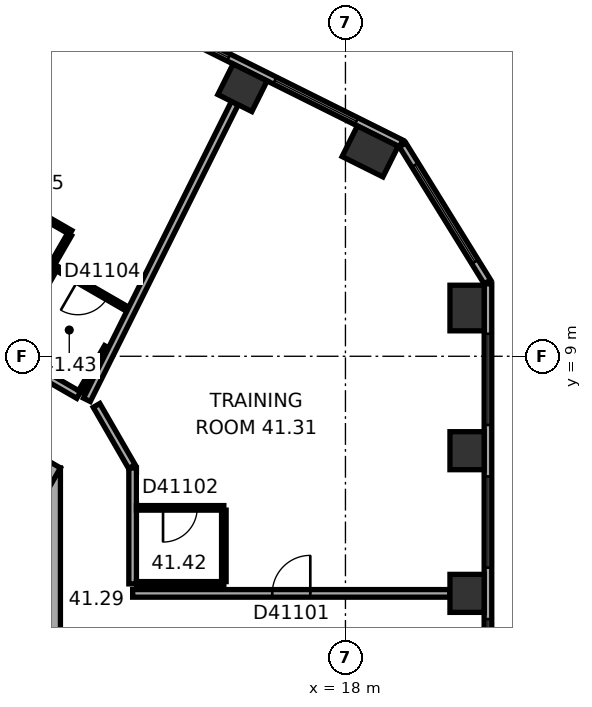
"""IFC4 building model, lengths in metres.
Left out: names, types, materials, properties, quantities, classifications, styles, units other than length and angle.
Written with IfcOpenShell. Run it as: python <this file> out.ifc"""

import sys

from ifc_helpers import new_model, si_unit, direction, frame, frame_2d, origin, origin_2d, place, context, subcontext, project, spatial, rectangle, extrude, element, fill, save


model = new_model("IFC4")
c1 = context("Model", 3, precision=1e-05, world=origin(), true_north=direction((0.0, 1.0)))
c2 = subcontext(c1, "Body", "Model", "MODEL_VIEW")
j1 = project(units=[si_unit("LENGTHUNIT", "METRE"), si_unit("PLANEANGLEUNIT", "RADIAN")], contexts=[c1])
p1 = place(None, origin())
s1 = spatial("IfcSite", under=j1, at=p1, CompositionType="ELEMENT")
p2 = place(p1, origin())
s2 = spatial("IfcBuilding", under=s1, at=p2, CompositionType="ELEMENT")
p3 = place(p2, frame((0.0, 0.0, 168.8)))
s3 = spatial("IfcBuildingStorey", under=s2, at=p3, CompositionType="ELEMENT", Elevation=168.8)
for number, where, z_axis, x_axis in (
    (1, (21.2, 2.761, 0.0), (0.0, 0.0, 1.0), (0.0, 1.0, 0.0)),
    (2, (21.2, 6.515, 0.0), (0.0, 0.0, 1.0), (0.0, 1.0, 0.0)),
):
    element("IfcColumn", number, at=place(p3, frame(where, z_axis=z_axis, x_axis=x_axis)), inside=s3, PredefinedType="COLUMN", context=c2, shape_type="SweptSolid", body=[
        extrude(rectangle(XDim=1.0, YDim=0.9, at=origin_2d()), origin(), (0.0, 0.0, 1.0), 3.7),
    ])
for number, where, z_axis, x_axis in (
    (3, (21.2, 10.27, 0.0), (0.0, 0.0, 1.0), (0.0, 1.0, 0.0)),
    (4, (18.65, 14.39, 0.0), (0.0, 0.0, 1.0), (-0.895, 0.446, 0.0)),
):
    element("IfcColumn", number, at=place(p3, frame(where, z_axis=z_axis, x_axis=x_axis)), inside=s3, PredefinedType="COLUMN", context=c2, shape_type="SweptSolid", body=[
        extrude(rectangle(XDim=1.2, YDim=0.9, at=origin_2d()), origin(), (0.0, 0.0, 1.0), 3.7),
    ])
p4 = place(p3, frame((15.29, 16.065, 0.0), z_axis=(0.0, 0.0, 1.0), x_axis=(-0.894934361602, 0.44619781311, 0.0)))
e5 = element("IfcColumn", 5, at=p4, inside=s3, PredefinedType="COLUMN", context=c2, shape_type="SweptSolid", body=[
    extrude(rectangle(XDim=1.0, YDim=0.9, at=origin_2d()), origin(), (0.0, 0.0, 1.0), 3.7),
])
p5 = place(p3, frame((10.0, -6.062, 0.0), z_axis=(0.0, 0.0, 1.0), x_axis=(0.0, 1.0, 0.0)))
e6 = element("IfcWall", 6, at=p5, inside=s3, PredefinedType="SHEAR", context=c2, shape_type="SweptSolid", body=[
    extrude(rectangle(XDim=12.125, YDim=1.0, at=frame_2d((6.062, 0.0))), origin(), (0.0, 0.0, 1.0), 3.7),
])
p6 = place(p5, frame((6.262, 0.0, 0.0)))
e7 = element("IfcOpeningElement", 7, at=p6, cuts=e6, PredefinedType="OPENING", context=c2, shape_type="SweptSolid", body=[
    extrude(rectangle(XDim=1.5, YDim=2.1, at=frame_2d((0.75, 1.05))), frame((0.0, 0.51, 0.0), z_axis=(0.0, -1.0, 0.0), x_axis=(1.0, 0.0, 0.0)), (0.0, 0.0, 1.0), 1.02),
])
p7 = place(p5, frame((1.812, 0.0, 0.0)))
e8 = element("IfcOpeningElement", 8, at=p7, cuts=e6, PredefinedType="OPENING", context=c2, shape_type="SweptSolid", body=[
    extrude(rectangle(XDim=0.9, YDim=2.1, at=frame_2d((0.45, 1.05))), frame((0.0, 0.51, 0.0), z_axis=(0.0, -1.0, 0.0), x_axis=(1.0, 0.0, 0.0)), (0.0, 0.0, 1.0), 1.02),
])
p8 = place(p5, frame((4.412, 0.0, 0.0)))
e9 = element("IfcOpeningElement", 9, at=p8, cuts=e6, PredefinedType="OPENING", context=c2, shape_type="SweptSolid", body=[
    extrude(rectangle(XDim=0.9, YDim=2.1, at=frame_2d((0.45, 1.05))), frame((0.0, 0.51, 0.0), z_axis=(0.0, -1.0, 0.0), x_axis=(1.0, 0.0, 0.0)), (0.0, 0.0, 1.0), 1.02),
])
p9 = place(p3, frame((10.25, 5.629, 0.0), z_axis=(0.0, 0.0, 1.0), x_axis=(-0.866022616891, 0.50000482701, 0.0)))
e10 = element("IfcWall", 10, at=p9, inside=s3, PredefinedType="SHEAR", context=c2, shape_type="SweptSolid", body=[
    extrude(rectangle(XDim=12.125, YDim=1.0, at=frame_2d((6.062, 0.0))), origin(), (0.0, 0.0, 1.0), 3.7),
])
p10 = place(p9, frame((4.012, 0.0, 0.0)))
e11 = element("IfcOpeningElement", 11, at=p10, cuts=e10, PredefinedType="OPENING", context=c2, shape_type="SweptSolid", body=[
    extrude(rectangle(XDim=0.9, YDim=2.1, at=frame_2d((0.45, 1.05))), frame((0.0, 0.51, 0.0), z_axis=(0.0, -1.0, 0.0), x_axis=(1.0, 0.0, 0.0)), (0.0, 0.0, 1.0), 1.02),
])
p11 = place(p9, frame((7.912, 0.0, 0.0)))
e12 = element("IfcOpeningElement", 12, at=p11, cuts=e10, PredefinedType="OPENING", context=c2, shape_type="SweptSolid", body=[
    extrude(rectangle(XDim=0.9, YDim=2.1, at=frame_2d((0.45, 1.05))), frame((0.0, 0.51, 0.0), z_axis=(0.0, -1.0, 0.0), x_axis=(1.0, 0.0, 0.0)), (0.0, 0.0, 1.0), 1.02),
])
p12 = place(p3, frame((21.75, -9.138, 0.0), z_axis=(0.0, 0.0, 1.0), x_axis=(0.0, 1.0, 0.0)))
e13 = element("IfcWall", 13, at=p12, inside=s3, PredefinedType="STANDARD", context=c2, shape_type="SweptSolid", body=[
    extrude(rectangle(XDim=20.044, YDim=0.2, at=frame_2d((10.022, 0.0))), origin(), (0.0, 0.0, 1.0), 3.7),
])
p13 = place(p12, frame((1.314, 0.0, 0.9)))
e14 = element("IfcOpeningElement", 14, at=p13, cuts=e13, PredefinedType="OPENING", context=c2, shape_type="SweptSolid", body=[
    extrude(rectangle(XDim=2.4, YDim=2.0, at=frame_2d((1.2, 1.0))), frame((0.0, 0.11, 0.0), z_axis=(0.0, -1.0, 0.0), x_axis=(1.0, 0.0, 0.0)), (0.0, 0.0, 1.0), 0.22),
])
p14 = place(p12, frame((5.069, 0.0, 0.9)))
e15 = element("IfcOpeningElement", 15, at=p14, cuts=e13, PredefinedType="OPENING", context=c2, shape_type="SweptSolid", body=[
    extrude(rectangle(XDim=2.4, YDim=2.0, at=frame_2d((1.2, 1.0))), frame((0.0, 0.11, 0.0), z_axis=(0.0, -1.0, 0.0), x_axis=(1.0, 0.0, 0.0)), (0.0, 0.0, 1.0), 0.22),
])
p15 = place(p12, frame((8.823, 0.0, 0.9)))
e16 = element("IfcOpeningElement", 16, at=p15, cuts=e13, PredefinedType="OPENING", context=c2, shape_type="SweptSolid", body=[
    extrude(rectangle(XDim=2.4, YDim=2.0, at=frame_2d((1.2, 1.0))), frame((0.0, 0.11, 0.0), z_axis=(0.0, -1.0, 0.0), x_axis=(1.0, 0.0, 0.0)), (0.0, 0.0, 1.0), 0.22),
])
p16 = place(p12, frame((12.577, 0.0, 0.9)))
e17 = element("IfcOpeningElement", 17, at=p16, cuts=e13, PredefinedType="OPENING", context=c2, shape_type="SweptSolid", body=[
    extrude(rectangle(XDim=2.4, YDim=2.0, at=frame_2d((1.2, 1.0))), frame((0.0, 0.11, 0.0), z_axis=(0.0, -1.0, 0.0), x_axis=(1.0, 0.0, 0.0)), (0.0, 0.0, 1.0), 0.22),
])
p17 = place(p12, frame((16.331, 0.0, 0.9)))
e18 = element("IfcOpeningElement", 18, at=p17, cuts=e13, PredefinedType="OPENING", context=c2, shape_type="SweptSolid", body=[
    extrude(rectangle(XDim=2.4, YDim=2.0, at=frame_2d((1.2, 1.0))), frame((0.0, 0.11, 0.0), z_axis=(0.0, -1.0, 0.0), x_axis=(1.0, 0.0, 0.0)), (0.0, 0.0, 1.0), 0.22),
])
p18 = place(p3, frame((21.735, 10.958, 0.0), z_axis=(0.0, 0.0, 1.0), x_axis=(-0.526213807775, 0.850352296702, 0.0)))
e19 = element("IfcWall", 19, at=p18, inside=s3, PredefinedType="STANDARD", context=c2, shape_type="SweptSolid", body=[
    extrude(rectangle(XDim=4.238, YDim=0.2, at=frame_2d((2.119, 0.0))), origin(), (0.0, 0.0, 1.0), 3.7),
])
p19 = place(p18, frame((0.619, 0.0, 0.9)))
e20 = element("IfcOpeningElement", 20, at=p19, cuts=e19, PredefinedType="OPENING", context=c2, shape_type="SweptSolid", body=[
    extrude(rectangle(XDim=3.0, YDim=2.0, at=frame_2d((1.5, 1.0))), frame((0.0, 0.11, 0.0), z_axis=(0.0, -1.0, 0.0), x_axis=(1.0, 0.0, 0.0)), (0.0, 0.0, 1.0), 0.22),
])
p20 = place(p3, frame((19.464, 14.599, 0.0), z_axis=(0.0, 0.0, 1.0), x_axis=(-0.894935755043, 0.446195018289, 0.0)))
e21 = element("IfcWall", 21, at=p20, inside=s3, PredefinedType="STANDARD", context=c2, shape_type="SweptSolid", body=[
    extrude(rectangle(XDim=20.044, YDim=0.2, at=frame_2d((10.022, 0.0))), origin(), (0.0, 0.0, 1.0), 3.7),
])
p21 = place(p20, frame((1.313, 0.0, 0.9)))
e22 = element("IfcOpeningElement", 22, at=p21, cuts=e21, PredefinedType="OPENING", context=c2, shape_type="SweptSolid", body=[
    extrude(rectangle(XDim=2.4, YDim=2.0, at=frame_2d((1.2, 1.0))), frame((0.0, 0.11, 0.0), z_axis=(0.0, -1.0, 0.0), x_axis=(1.0, 0.0, 0.0)), (0.0, 0.0, 1.0), 0.22),
])
p22 = place(p20, frame((5.067, 0.0, 0.9)))
e23 = element("IfcOpeningElement", 23, at=p22, cuts=e21, PredefinedType="OPENING", context=c2, shape_type="SweptSolid", body=[
    extrude(rectangle(XDim=2.4, YDim=2.0, at=frame_2d((1.2, 1.0))), frame((0.0, 0.11, 0.0), z_axis=(0.0, -1.0, 0.0), x_axis=(1.0, 0.0, 0.0)), (0.0, 0.0, 1.0), 0.22),
])
p23 = place(p20, frame((8.821, 0.0, 0.9)))
e24 = element("IfcOpeningElement", 24, at=p23, cuts=e21, PredefinedType="OPENING", context=c2, shape_type="SweptSolid", body=[
    extrude(rectangle(XDim=2.4, YDim=2.0, at=frame_2d((1.2, 1.0))), frame((0.0, 0.11, 0.0), z_axis=(0.0, -1.0, 0.0), x_axis=(1.0, 0.0, 0.0)), (0.0, 0.0, 1.0), 0.22),
])
p24 = place(p20, frame((12.575, 0.0, 0.9)))
e25 = element("IfcOpeningElement", 25, at=p24, cuts=e21, PredefinedType="OPENING", context=c2, shape_type="SweptSolid", body=[
    extrude(rectangle(XDim=2.4, YDim=2.0, at=frame_2d((1.2, 1.0))), frame((0.0, 0.11, 0.0), z_axis=(0.0, -1.0, 0.0), x_axis=(1.0, 0.0, 0.0)), (0.0, 0.0, 1.0), 0.22),
])
p25 = place(p20, frame((16.329, 0.0, 0.9)))
e26 = element("IfcOpeningElement", 26, at=p25, cuts=e21, PredefinedType="OPENING", context=c2, shape_type="SweptSolid", body=[
    extrude(rectangle(XDim=2.4, YDim=2.0, at=frame_2d((1.2, 1.0))), frame((0.0, 0.11, 0.0), z_axis=(0.0, -1.0, 0.0), x_axis=(1.0, 0.0, 0.0)), (0.0, 0.0, 1.0), 0.22),
])
p26 = place(p3, frame((7.878, 13.927, 0.0), z_axis=(0.0, 0.0, 1.0), x_axis=(0.866021245731, -0.500007201891, 0.0)))
e27 = element("IfcWall", 27, at=p26, inside=s3, PredefinedType="PARTITIONING", context=c2, shape_type="SweptSolid", body=[
    extrude(rectangle(XDim=3.34, YDim=0.12, at=frame_2d((1.67, 0.0))), origin(), (0.0, 0.0, 1.0), 3.42),
])
p27 = place(p26, frame((1.22, 0.0, 0.0)))
e28 = element("IfcOpeningElement", 28, at=p27, cuts=e27, PredefinedType="OPENING", context=c2, shape_type="SweptSolid", body=[
    extrude(rectangle(XDim=0.9, YDim=2.1, at=frame_2d((0.45, 1.05))), frame((0.0, 0.07, 0.0), z_axis=(0.0, -1.0, 0.0), x_axis=(1.0, 0.0, 0.0)), (0.0, 0.0, 1.0), 0.14),
])
p28 = place(p3, frame((9.125, 9.166, 0.0), z_axis=(0.0, 0.0, 1.0), x_axis=(0.500004234368, 0.866022959057, 0.0)))
e29 = element("IfcWall", 29, at=p28, inside=s3, PredefinedType="PARTITIONING", context=c2, shape_type="SweptSolid", body=[
    extrude(rectangle(XDim=2.5, YDim=0.12, at=frame_2d((1.25, 0.0))), origin(), (0.0, 0.0, 1.0), 3.42),
])
p29 = place(p3, frame((10.427, 11.301, 0.0), z_axis=(0.0, 0.0, 1.0), x_axis=(0.866019511163, -0.500010206181, 0.0)))
e30 = element("IfcWall", 30, at=p29, inside=s3, PredefinedType="PARTITIONING", context=c2, shape_type="SweptSolid", body=[
    extrude(rectangle(XDim=2.13, YDim=0.12, at=frame_2d((1.065, 0.0))), origin(), (0.0, 0.0, 1.0), 3.42),
])
p30 = place(p29, frame((0.615, 0.0, 0.0)))
e31 = element("IfcOpeningElement", 31, at=p30, cuts=e30, PredefinedType="OPENING", context=c2, shape_type="SweptSolid", body=[
    extrude(rectangle(XDim=0.9, YDim=2.1, at=frame_2d((0.45, 1.05))), frame((0.0, 0.07, 0.0), z_axis=(0.0, -1.0, 0.0), x_axis=(1.0, 0.0, 0.0)), (0.0, 0.0, 1.0), 0.14),
])
p31 = place(p3, frame((10.74, 12.205, 0.0), z_axis=(0.0, 0.0, 1.0), x_axis=(-0.499978425106, -0.866037859697, 0.0)))
e32 = element("IfcWall", 32, at=p31, inside=s3, PredefinedType="PARTITIONING", context=c2, shape_type="SweptSolid", body=[
    extrude(rectangle(XDim=3.44, YDim=0.12, at=frame_2d((1.72, 0.0))), origin(), (0.0, 0.0, 1.0), 3.42),
])
p32 = place(p3, frame((10.98, 7.979, 0.0), z_axis=(0.0, 0.0, 1.0), x_axis=(-0.866008176907, 0.50002983664, 0.0)))
e33 = element("IfcWall", 33, at=p32, inside=s3, PredefinedType="PARTITIONING", context=c2, shape_type="SweptSolid", body=[
    extrude(rectangle(XDim=2.2, YDim=0.2, at=frame_2d((1.1, 0.0))), origin(), (0.0, 0.0, 1.0), 3.42),
])
p33 = place(p3, frame((11.714, 9.25, 0.0), z_axis=(0.0, 0.0, 1.0), x_axis=(-0.500015945769, -0.866016197294, 0.0)))
e34 = element("IfcWall", 34, at=p33, inside=s3, PredefinedType="PARTITIONING", context=c2, shape_type="SweptSolid", body=[
    extrude(rectangle(XDim=1.368, YDim=0.12, at=frame_2d((0.684, 0.0))), origin(), (0.0, 0.0, 1.0), 3.42),
])
p34 = place(p3, frame((12.38, 6.097, 0.0), z_axis=(0.0, 0.0, 1.0), x_axis=(-0.499964847546, 0.866045698112, 0.0)))
e35 = element("IfcWall", 35, at=p34, inside=s3, PredefinedType="PARTITIONING", context=c2, shape_type="SweptSolid", body=[
    extrude(rectangle(XDim=1.86, YDim=0.2, at=frame_2d((0.93, 0.0))), origin(), (0.0, 0.0, 1.0), 3.42),
])
p35 = place(p3, frame((12.4, 3.011, 0.0), z_axis=(0.0, 0.0, 1.0), x_axis=(0.0, 1.0, 0.0)))
e36 = element("IfcWall", 36, at=p35, inside=s3, PredefinedType="PARTITIONING", context=c2, shape_type="SweptSolid", body=[
    extrude(rectangle(XDim=3.051, YDim=0.2, at=frame_2d((1.525, 0.0))), origin(), (0.0, 0.0, 1.0), 3.42),
])
p36 = place(p3, frame((12.5, 5.011, 0.0), z_axis=(0.0, 0.0, 1.0), x_axis=(1.0, 0.0, 0.0)))
e37 = element("IfcWall", 37, at=p36, inside=s3, PredefinedType="PARTITIONING", context=c2, shape_type="SweptSolid", body=[
    extrude(rectangle(XDim=2.3, YDim=0.12, at=frame_2d((1.15, 0.0))), origin(), (0.0, 0.0, 1.0), 3.42),
])
p37 = place(p36, frame((0.7, 0.0, 0.0)))
e38 = element("IfcOpeningElement", 38, at=p37, cuts=e37, PredefinedType="OPENING", context=c2, shape_type="SweptSolid", body=[
    extrude(rectangle(XDim=0.9, YDim=2.1, at=frame_2d((0.45, 1.05))), frame((0.0, 0.07, 0.0), z_axis=(0.0, -1.0, 0.0), x_axis=(1.0, 0.0, 0.0)), (0.0, 0.0, 1.0), 0.14),
])
p38 = place(p3, frame((14.8, 3.011, 0.0), z_axis=(0.0, 0.0, 1.0), x_axis=(-1.0, 0.0, 0.0)))
e39 = element("IfcWall", 39, at=p38, inside=s3, PredefinedType="PARTITIONING", context=c2, shape_type="SweptSolid", body=[
    extrude(rectangle(XDim=2.3, YDim=0.12, at=frame_2d((1.15, 0.0))), origin(), (0.0, 0.0, 1.0), 3.42),
])
p39 = place(p3, frame((14.8, 4.951, 0.0), z_axis=(0.0, 0.0, 1.0), x_axis=(0.0, -1.0, 0.0)))
e40 = element("IfcWall", 40, at=p39, inside=s3, PredefinedType="PARTITIONING", context=c2, shape_type="SweptSolid", body=[
    extrude(rectangle(XDim=1.88, YDim=0.12, at=frame_2d((0.94, 0.0))), origin(), (0.0, 0.0, 1.0), 3.42),
])
p40 = place(p3, frame((15.09, 15.663, 0.0), z_axis=(0.0, 0.0, 1.0), x_axis=(-0.446206011687, -0.894930273895, 0.0)))
e41 = element("IfcWall", 41, at=p40, inside=s3, PredefinedType="PARTITIONING", context=c2, shape_type="SweptSolid", body=[
    extrude(rectangle(XDim=8.725, YDim=0.2, at=frame_2d((4.363, 0.0))), origin(), (0.0, 0.0, 1.0), 3.42),
])
p41 = place(p3, frame((20.75, 2.761, 0.0), z_axis=(0.0, 0.0, 1.0), x_axis=(-1.0, 0.0, 0.0)))
e42 = element("IfcWall", 42, at=p41, inside=s3, PredefinedType="PARTITIONING", context=c2, shape_type="SweptSolid", body=[
    extrude(rectangle(XDim=8.35, YDim=0.2, at=frame_2d((4.175, 0.0))), origin(), (0.0, 0.0, 1.0), 3.42),
])
p42 = place(p41, frame((3.675, 0.0, 0.0)))
e43 = element("IfcOpeningElement", 43, at=p42, cuts=e42, PredefinedType="OPENING", context=c2, shape_type="SweptSolid", body=[
    extrude(rectangle(XDim=1.0, YDim=2.1, at=frame_2d((0.5, 1.05))), frame((0.0, 0.11, 0.0), z_axis=(0.0, -1.0, 0.0), x_axis=(1.0, 0.0, 0.0)), (0.0, 0.0, 1.0), 0.22),
])
p43 = place(p15, origin())
e44 = element("IfcWindow", 44, at=p43, inside=s3, PartitioningType="SINGLE_PANEL", PredefinedType="WINDOW", context=c2, shape_type="SweptSolid", body=[
    extrude(rectangle(XDim=2.4, YDim=2.0, at=frame_2d((1.2, 1.0))), frame((0.0, 0.03, 0.0), z_axis=(0.0, -1.0, 0.0), x_axis=(1.0, 0.0, 0.0)), (0.0, 0.0, 1.0), 0.06),
])
fill(e16, e44)
p44 = place(p16, origin())
e45 = element("IfcWindow", 45, at=p44, inside=s3, PartitioningType="SINGLE_PANEL", PredefinedType="WINDOW", context=c2, shape_type="SweptSolid", body=[
    extrude(rectangle(XDim=2.4, YDim=2.0, at=frame_2d((1.2, 1.0))), frame((0.0, 0.03, 0.0), z_axis=(0.0, -1.0, 0.0), x_axis=(1.0, 0.0, 0.0)), (0.0, 0.0, 1.0), 0.06),
])
fill(e17, e45)
p45 = place(p17, origin())
e46 = element("IfcWindow", 46, at=p45, inside=s3, PartitioningType="SINGLE_PANEL", PredefinedType="WINDOW", context=c2, shape_type="SweptSolid", body=[
    extrude(rectangle(XDim=2.4, YDim=2.0, at=frame_2d((1.2, 1.0))), frame((0.0, 0.03, 0.0), z_axis=(0.0, -1.0, 0.0), x_axis=(1.0, 0.0, 0.0)), (0.0, 0.0, 1.0), 0.06),
])
fill(e18, e46)
p46 = place(p19, origin())
e47 = element("IfcWindow", 47, at=p46, inside=s3, PartitioningType="SINGLE_PANEL", PredefinedType="WINDOW", context=c2, shape_type="SweptSolid", body=[
    extrude(rectangle(XDim=3.0, YDim=2.0, at=frame_2d((1.5, 1.0))), frame((0.0, 0.03, 0.0), z_axis=(0.0, -1.0, 0.0), x_axis=(1.0, 0.0, 0.0)), (0.0, 0.0, 1.0), 0.06),
])
fill(e20, e47)
p47 = place(p21, origin())
e48 = element("IfcWindow", 48, at=p47, inside=s3, PartitioningType="SINGLE_PANEL", PredefinedType="WINDOW", context=c2, shape_type="SweptSolid", body=[
    extrude(rectangle(XDim=2.4, YDim=2.0, at=frame_2d((1.2, 1.0))), frame((0.0, 0.03, 0.0), z_axis=(0.0, -1.0, 0.0), x_axis=(1.0, 0.0, 0.0)), (0.0, 0.0, 1.0), 0.06),
])
fill(e22, e48)
p48 = place(p22, origin())
e49 = element("IfcWindow", 49, at=p48, inside=s3, PartitioningType="SINGLE_PANEL", PredefinedType="WINDOW", context=c2, shape_type="SweptSolid", body=[
    extrude(rectangle(XDim=2.4, YDim=2.0, at=frame_2d((1.2, 1.0))), frame((0.0, 0.03, 0.0), z_axis=(0.0, -1.0, 0.0), x_axis=(1.0, 0.0, 0.0)), (0.0, 0.0, 1.0), 0.06),
])
fill(e23, e49)
p49 = place(p42, origin())
e50 = element("IfcDoor", 50, at=p49, inside=s3, OperationType="SINGLE_SWING_LEFT", PredefinedType="DOOR", context=c2, shape_type="SweptSolid", body=[
    extrude(rectangle(XDim=1.0, YDim=2.1, at=frame_2d((0.5, 1.05))), frame((0.0, 0.025, 0.0), z_axis=(0.0, -1.0, 0.0), x_axis=(1.0, 0.0, 0.0)), (0.0, 0.0, 1.0), 0.05),
])
fill(e43, e50)
p50 = place(p37, origin())
e51 = element("IfcDoor", 51, at=p50, inside=s3, OperationType="SINGLE_SWING_LEFT", PredefinedType="DOOR", context=c2, shape_type="SweptSolid", body=[
    extrude(rectangle(XDim=0.9, YDim=2.1, at=frame_2d((0.45, 1.05))), frame((0.0, 0.025, 0.0), z_axis=(0.0, -1.0, 0.0), x_axis=(1.0, 0.0, 0.0)), (0.0, 0.0, 1.0), 0.05),
])
fill(e38, e51)
p51 = place(p30, origin())
e52 = element("IfcDoor", 52, at=p51, inside=s3, OperationType="SINGLE_SWING_LEFT", PredefinedType="DOOR", context=c2, shape_type="SweptSolid", body=[
    extrude(rectangle(XDim=0.9, YDim=2.1, at=frame_2d((0.45, 1.05))), frame((0.0, 0.025, 0.0), z_axis=(0.0, -1.0, 0.0), x_axis=(1.0, 0.0, 0.0)), (0.0, 0.0, 1.0), 0.05),
])
fill(e31, e52)
save(model, sys.argv[1])
